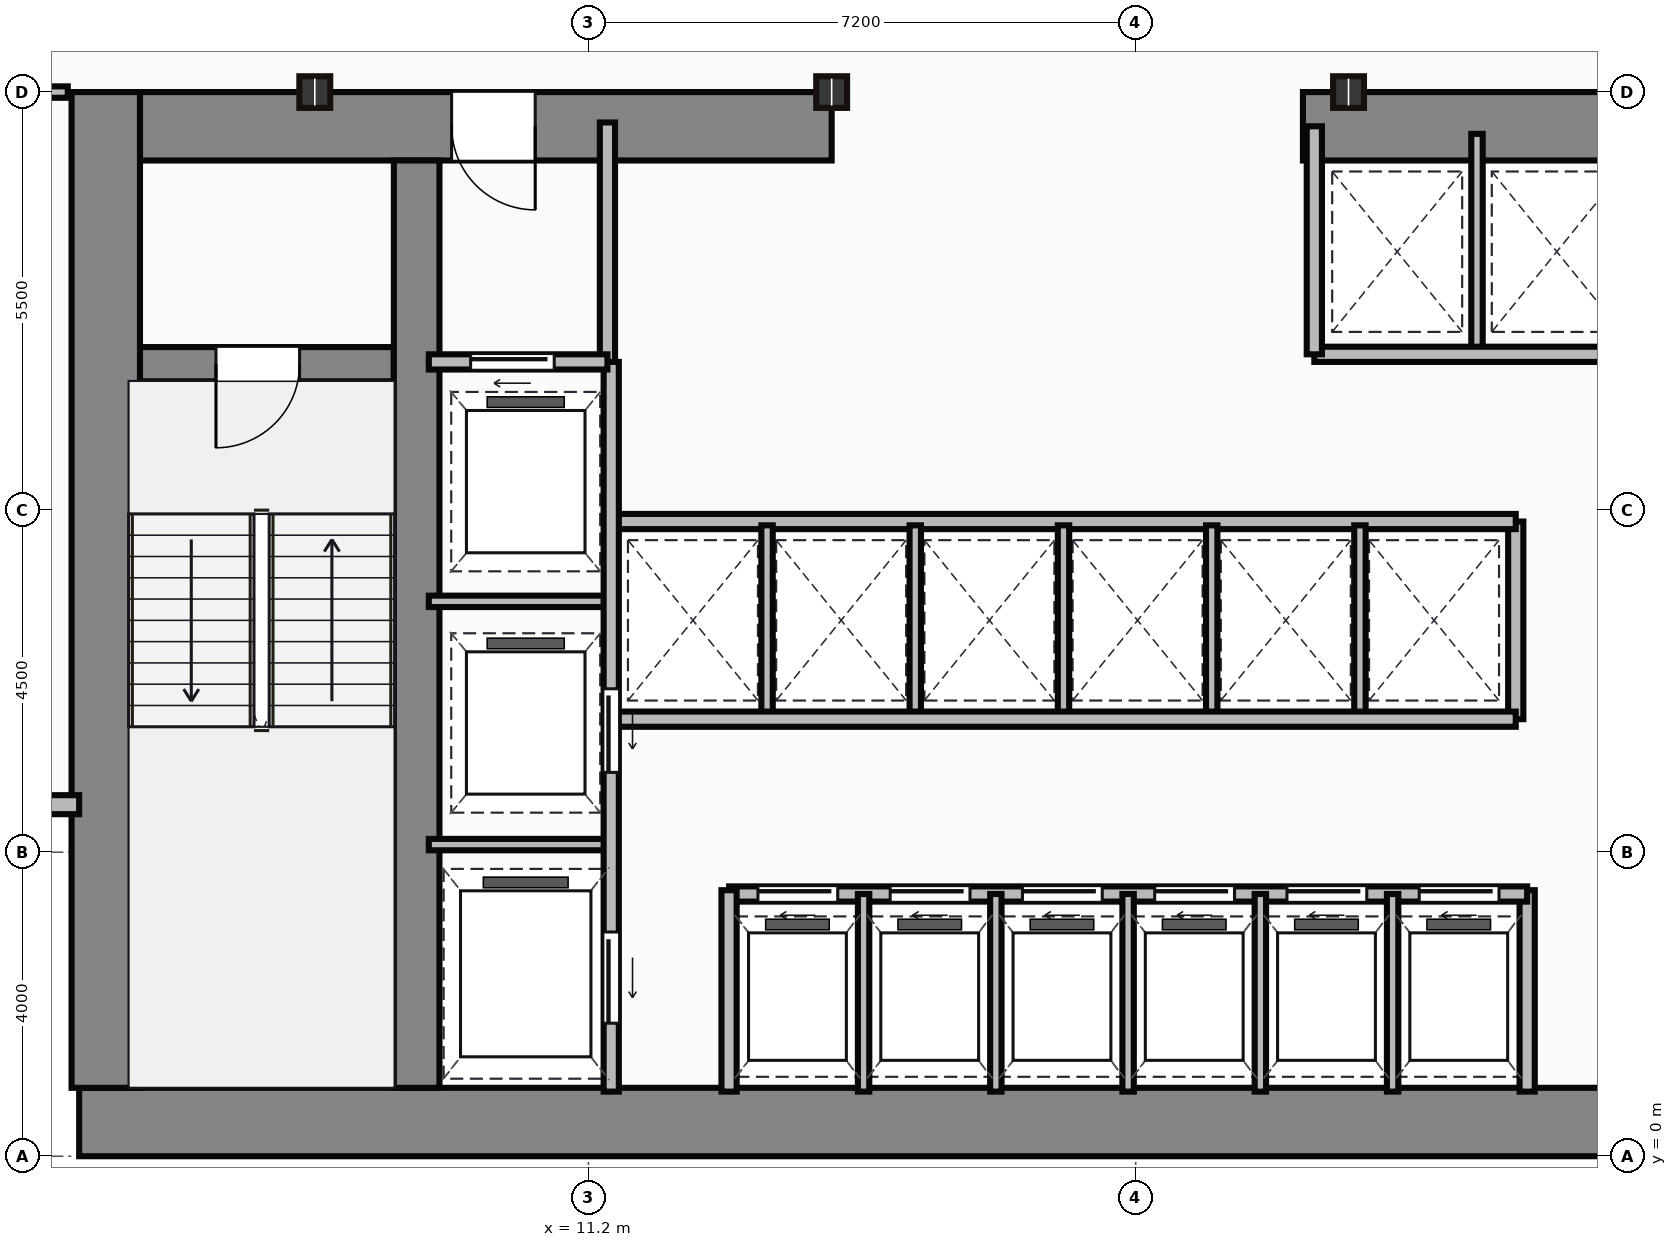
"""IFC4 building model, lengths in metres.
Left out: names, types, materials, properties, quantities, classifications, styles, units other than length and angle.
Written with IfcOpenShell. Run it as: python <this file> out.ifc"""

import sys

from ifc_helpers import new_model, si_unit, direction, frame, frame_2d, origin, origin_2d, place, context, subcontext, project, spatial, rectangle, i_section, extrude, source, transform, mapped, element, fill, save


model = new_model("IFC4")
c1 = context("Model", 3, precision=1e-05, world=origin(), true_north=direction((0.0, 1.0)))
c2 = subcontext(c1, "Body", "Model", "MODEL_VIEW")
j1 = project(units=[si_unit("LENGTHUNIT", "METRE"), si_unit("PLANEANGLEUNIT", "RADIAN")], contexts=[c1])
p1 = place(None, origin())
s1 = spatial("IfcSite", under=j1, at=p1, CompositionType="ELEMENT")
p2 = place(p1, origin())
s2 = spatial("IfcBuilding", under=s1, at=p2, CompositionType="ELEMENT")
p3 = place(p2, frame((0.0, 0.0, 76.3)))
s3 = spatial("IfcBuildingStorey", under=s2, at=p3, CompositionType="ELEMENT", Elevation=76.3)
m1 = source(origin(), c2, "Body", "SweptSolid", [
    extrude(rectangle(XDim=29.5, YDim=0.9, at=frame_2d((14.75, 0.0))), origin(), (0.0, 0.0, 1.0), 3.65),
])
p4 = place(p3, frame((4.5, 0.45, 0.0), z_axis=(0.0, 0.0, 1.0), x_axis=(1.0, 0.0, 0.0)))
e1 = element("IfcWall", 1, at=p4, inside=s3, PredefinedType="SHEAR", context=c2, shape_type="MappedRepresentation", body=[
    mapped(m1, transform((0.0, 0.0, 0.0))),
])
m2 = source(origin(), c2, "Body", "SweptSolid", [
    extrude(rectangle(XDim=13.1, YDim=0.9, at=frame_2d((6.55, 0.0))), origin(), (0.0, 0.0, 1.0), 3.65),
])
p5 = place(p3, frame((4.85, 0.9, 0.0), z_axis=(0.0, 0.0, 1.0), x_axis=(0.0, 1.0, 0.0)))
e2 = element("IfcWall", 2, at=p5, inside=s3, PredefinedType="SHEAR", context=c2, shape_type="MappedRepresentation", body=[
    mapped(m2, transform((0.0, 0.0, 0.0))),
])
m3 = source(origin(), c2, "Body", "SweptSolid", [
    extrude(rectangle(XDim=9.1, YDim=0.9, at=frame_2d((4.55, 0.0))), origin(), (0.0, 0.0, 1.0), 3.65),
])
p6 = place(p3, frame((5.3, 13.55, 0.0), z_axis=(0.0, 0.0, 1.0), x_axis=(1.0, 0.0, 0.0)))
e3 = element("IfcWall", 3, at=p6, inside=s3, PredefinedType="SHEAR", context=c2, shape_type="MappedRepresentation", body=[
    mapped(m3, transform((0.0, 0.0, 0.0))),
])
p7 = place(p6, frame((4.1, 0.0, 0.0)))
e4 = element("IfcOpeningElement", 4, at=p7, cuts=e3, PredefinedType="OPENING", context=c2, shape_type="SweptSolid", body=[
    extrude(rectangle(XDim=1.1, YDim=2.15, at=frame_2d((0.55, 1.075))), frame((0.0, 0.46, 0.0), z_axis=(0.0, -1.0, 0.0), x_axis=(1.0, 0.0, 0.0)), (0.0, 0.0, 1.0), 0.92),
])
m4 = source(origin(), c2, "Body", "SweptSolid", [
    extrude(rectangle(XDim=12.6, YDim=0.9, at=frame_2d((6.3, 0.0))), origin(), (0.0, 0.0, 1.0), 3.65),
])
p8 = place(p3, frame((20.6, 13.55, 0.0), z_axis=(0.0, 0.0, 1.0), x_axis=(1.0, 0.0, 0.0)))
e5 = element("IfcWall", 5, at=p8, inside=s3, PredefinedType="SHEAR", context=c2, shape_type="MappedRepresentation", body=[
    mapped(m4, transform((0.0, 0.0, 0.0))),
])
p9 = place(p8, frame((9.25, 0.0, 0.0)))
e6 = element("IfcOpeningElement", 6, at=p9, cuts=e5, PredefinedType="OPENING", context=c2, shape_type="SweptSolid", body=[
    extrude(rectangle(XDim=1.1, YDim=2.15, at=frame_2d((0.55, 1.075))), frame((0.0, 0.46, 0.0), z_axis=(0.0, -1.0, 0.0), x_axis=(1.0, 0.0, 0.0)), (0.0, 0.0, 1.0), 0.92),
])
m5 = source(origin(), c2, "Body", "SweptSolid", [
    extrude(rectangle(XDim=12.2, YDim=0.6, at=frame_2d((6.1, 0.0))), origin(), (0.0, 0.0, 1.0), 3.65),
])
p10 = place(p3, frame((8.94, 0.9, 0.0), z_axis=(0.0, 0.0, 1.0), x_axis=(0.0, 1.0, 0.0)))
e7 = element("IfcWall", 7, at=p10, inside=s3, PredefinedType="SHEAR", context=c2, shape_type="MappedRepresentation", body=[
    mapped(m5, transform((0.0, 0.0, 0.0))),
])
m6 = source(origin(), c2, "Body", "SweptSolid", [
    extrude(rectangle(XDim=3.39, YDim=0.45, at=frame_2d((1.695, 0.0))), origin(), (0.0, 0.0, 1.0), 3.65),
])
p11 = place(p3, frame((5.25, 10.42, 0.0), z_axis=(0.0, 0.0, 1.0), x_axis=(1.0, 0.0, 0.0)))
e8 = element("IfcWall", 8, at=p11, inside=s3, PredefinedType="SHEAR", context=c2, shape_type="MappedRepresentation", body=[
    mapped(m6, transform((0.0, 0.0, 0.0))),
])
p12 = place(p11, frame((1.05, 0.0, 0.0)))
e9 = element("IfcOpeningElement", 9, at=p12, cuts=e8, PredefinedType="OPENING", context=c2, shape_type="SweptSolid", body=[
    extrude(rectangle(XDim=1.1, YDim=2.15, at=frame_2d((0.55, 1.075))), frame((0.0, 0.235, 0.0), z_axis=(0.0, -1.0, 0.0), x_axis=(1.0, 0.0, 0.0)), (0.0, 0.0, 1.0), 0.47),
])
m7 = source(origin(), c2, "Body", "SweptSolid", [
    extrude(i_section(OverallWidth=0.406, OverallDepth=0.416, WebThickness=0.03, FlangeThickness=0.048, at=origin_2d()), origin(), (0.0, 0.0, 1.0), 3.65),
])
for number, where, z_axis, x_axis in (
    (10, (7.6, 14.0, 0.0), (0.0, 0.0, 1.0), (1.0, 0.0, 0.0)),
    (11, (14.4, 14.0, 0.0), (0.0, 0.0, 1.0), (1.0, 0.0, 0.0)),
    (12, (21.2, 14.0, 0.0), (0.0, 0.0, 1.0), (1.0, 0.0, 0.0)),
):
    element("IfcColumn", number, at=place(p3, frame(where, z_axis=z_axis, x_axis=x_axis)), inside=s3, PredefinedType="COLUMN", context=c2, shape_type="MappedRepresentation", body=[
        mapped(m7, transform((0.0, 0.0, 0.0))),
    ])
m8 = source(origin(), c2, "Body", "SweptSolid", [
    extrude(rectangle(XDim=4.5, YDim=0.25, at=frame_2d((2.25, 0.0))), origin(), (0.0, 0.0, 1.0), 3.4),
])
p13 = place(p3, frame((0.0, 4.625, 0.0), z_axis=(0.0, 0.0, 1.0), x_axis=(1.0, 0.0, 0.0)))
e13 = element("IfcWall", 13, at=p13, inside=s3, PredefinedType="STANDARD", context=c2, shape_type="MappedRepresentation", body=[
    mapped(m8, transform((0.0, 0.0, 0.0))),
])
m9 = source(origin(), c2, "Body", "SweptSolid", [
    extrude(rectangle(XDim=3.18, YDim=0.2, at=frame_2d((1.59, 0.0))), origin(), (0.0, 0.0, 1.0), 3.4),
])
p14 = place(p3, frame((11.45, 10.42, 0.0), z_axis=(0.0, 0.0, 1.0), x_axis=(0.0, 1.0, 0.0)))
e14 = element("IfcWall", 14, at=p14, inside=s3, PredefinedType="PARTITIONING", context=c2, shape_type="MappedRepresentation", body=[
    mapped(m9, transform((0.0, 0.0, 0.0))),
])
m10 = source(origin(), c2, "Body", "SweptSolid", [
    extrude(rectangle(XDim=2.35, YDim=0.2, at=frame_2d((1.175, 0.0))), origin(), (0.0, 0.0, 1.0), 3.4),
])
p15 = place(p3, frame((9.1, 10.45, 0.0), z_axis=(0.0, 0.0, 1.0), x_axis=(1.0, 0.0, 0.0)))
e15 = element("IfcWall", 15, at=p15, inside=s3, PredefinedType="PARTITIONING", context=c2, shape_type="MappedRepresentation", body=[
    mapped(m10, transform((0.0, 0.0, 0.0))),
])
p16 = place(p15, frame((0.55, 0.0, 0.0)))
e16 = element("IfcOpeningElement", 16, at=p16, cuts=e15, PredefinedType="OPENING", context=c2, shape_type="SweptSolid", body=[
    extrude(rectangle(XDim=1.1, YDim=2.15, at=frame_2d((0.55, 1.075))), frame((0.0, 0.11, 0.0), z_axis=(0.0, -1.0, 0.0), x_axis=(1.0, 0.0, 0.0)), (0.0, 0.0, 1.0), 0.22),
])
m11 = source(origin(), c2, "Body", "SweptSolid", [
    extrude(rectangle(XDim=9.6, YDim=0.2, at=frame_2d((4.8, 0.0))), origin(), (0.0, 0.0, 1.0), 3.4),
])
p17 = place(p3, frame((11.5, 0.85, 0.0), z_axis=(0.0, 0.0, 1.0), x_axis=(0.0, 1.0, 0.0)))
e17 = element("IfcWall", 17, at=p17, inside=s3, PredefinedType="PARTITIONING", context=c2, shape_type="MappedRepresentation", body=[
    mapped(m11, transform((0.0, 0.0, 0.0))),
])
p18 = place(p17, frame((4.2, 0.0, 0.0)))
e18 = element("IfcOpeningElement", 18, at=p18, cuts=e17, PredefinedType="OPENING", context=c2, shape_type="SweptSolid", body=[
    extrude(rectangle(XDim=1.1, YDim=2.15, at=frame_2d((0.55, 1.075))), frame((0.0, 0.11, 0.0), z_axis=(0.0, -1.0, 0.0), x_axis=(1.0, 0.0, 0.0)), (0.0, 0.0, 1.0), 0.22),
])
p19 = place(p17, frame((0.9, 0.0, 0.0)))
e19 = element("IfcOpeningElement", 19, at=p19, cuts=e17, PredefinedType="OPENING", context=c2, shape_type="SweptSolid", body=[
    extrude(rectangle(XDim=1.2, YDim=2.15, at=frame_2d((0.6, 1.075))), frame((0.0, 0.11, 0.0), z_axis=(0.0, -1.0, 0.0), x_axis=(1.0, 0.0, 0.0)), (0.0, 0.0, 1.0), 0.22),
])
m12 = source(origin(), c2, "Body", "SweptSolid", [
    extrude(rectangle(XDim=2.4, YDim=0.15, at=frame_2d((1.2, 0.0))), origin(), (0.0, 0.0, 1.0), 3.4),
])
for number, where, z_axis, x_axis in (
    (20, (9.1, 4.1, 0.0), (0.0, 0.0, 1.0), (1.0, 0.0, 0.0)),
    (21, (9.1, 7.3, 0.0), (0.0, 0.0, 1.0), (1.0, 0.0, 0.0)),
):
    element("IfcWall", number, at=place(p3, frame(where, z_axis=z_axis, x_axis=x_axis)), inside=s3, PredefinedType="PARTITIONING", context=c2, shape_type="MappedRepresentation", body=[
        mapped(m12, transform((0.0, 0.0, 0.0))),
    ])
m13 = source(origin(), c2, "Body", "SweptSolid", [
    extrude(rectangle(XDim=2.65, YDim=0.2, at=frame_2d((1.325, 0.0))), origin(), (0.0, 0.0, 1.0), 3.4),
])
p20 = place(p3, frame((13.05, 0.85, 0.0), z_axis=(0.0, 0.0, 1.0), x_axis=(0.0, 1.0, 0.0)))
e22 = element("IfcWall", 22, at=p20, inside=s3, PredefinedType="PARTITIONING", context=c2, shape_type="MappedRepresentation", body=[
    mapped(m13, transform((0.0, 0.0, 0.0))),
])
m14 = source(origin(), c2, "Body", "SweptSolid", [
    extrude(rectangle(XDim=10.5, YDim=0.2, at=frame_2d((5.25, 0.0))), origin(), (0.0, 0.0, 1.0), 3.4),
])
p21 = place(p3, frame((13.05, 3.45, 0.0), z_axis=(0.0, 0.0, 1.0), x_axis=(1.0, 0.0, 0.0)))
e23 = element("IfcWall", 23, at=p21, inside=s3, PredefinedType="PARTITIONING", context=c2, shape_type="MappedRepresentation", body=[
    mapped(m14, transform((0.0, 0.0, 0.0))),
])
p22 = place(p21, frame((0.38, 0.0, 0.0)))
e24 = element("IfcOpeningElement", 24, at=p22, cuts=e23, PredefinedType="OPENING", context=c2, shape_type="SweptSolid", body=[
    extrude(rectangle(XDim=1.05, YDim=2.15, at=frame_2d((0.525, 1.075))), frame((0.0, 0.11, 0.0), z_axis=(0.0, -1.0, 0.0), x_axis=(1.0, 0.0, 0.0)), (0.0, 0.0, 1.0), 0.22),
])
p23 = place(p21, frame((2.12, 0.0, 0.0)))
e25 = element("IfcOpeningElement", 25, at=p23, cuts=e23, PredefinedType="OPENING", context=c2, shape_type="SweptSolid", body=[
    extrude(rectangle(XDim=1.05, YDim=2.15, at=frame_2d((0.525, 1.075))), frame((0.0, 0.11, 0.0), z_axis=(0.0, -1.0, 0.0), x_axis=(1.0, 0.0, 0.0)), (0.0, 0.0, 1.0), 0.22),
])
p24 = place(p21, frame((3.86, 0.0, 0.0)))
e26 = element("IfcOpeningElement", 26, at=p24, cuts=e23, PredefinedType="OPENING", context=c2, shape_type="SweptSolid", body=[
    extrude(rectangle(XDim=1.05, YDim=2.15, at=frame_2d((0.525, 1.075))), frame((0.0, 0.11, 0.0), z_axis=(0.0, -1.0, 0.0), x_axis=(1.0, 0.0, 0.0)), (0.0, 0.0, 1.0), 0.22),
])
p25 = place(p21, frame((5.6, 0.0, 0.0)))
e27 = element("IfcOpeningElement", 27, at=p25, cuts=e23, PredefinedType="OPENING", context=c2, shape_type="SweptSolid", body=[
    extrude(rectangle(XDim=1.05, YDim=2.15, at=frame_2d((0.525, 1.075))), frame((0.0, 0.11, 0.0), z_axis=(0.0, -1.0, 0.0), x_axis=(1.0, 0.0, 0.0)), (0.0, 0.0, 1.0), 0.22),
])
p26 = place(p21, frame((7.34, 0.0, 0.0)))
e28 = element("IfcOpeningElement", 28, at=p26, cuts=e23, PredefinedType="OPENING", context=c2, shape_type="SweptSolid", body=[
    extrude(rectangle(XDim=1.05, YDim=2.15, at=frame_2d((0.525, 1.075))), frame((0.0, 0.11, 0.0), z_axis=(0.0, -1.0, 0.0), x_axis=(1.0, 0.0, 0.0)), (0.0, 0.0, 1.0), 0.22),
])
p27 = place(p21, frame((9.08, 0.0, 0.0)))
e29 = element("IfcOpeningElement", 29, at=p27, cuts=e23, PredefinedType="OPENING", context=c2, shape_type="SweptSolid", body=[
    extrude(rectangle(XDim=1.05, YDim=2.15, at=frame_2d((0.525, 1.075))), frame((0.0, 0.11, 0.0), z_axis=(0.0, -1.0, 0.0), x_axis=(1.0, 0.0, 0.0)), (0.0, 0.0, 1.0), 0.22),
])
p28 = place(p3, frame((23.55, 0.85, 0.0), z_axis=(0.0, 0.0, 1.0), x_axis=(0.0, 1.0, 0.0)))
e30 = element("IfcWall", 30, at=p28, inside=s3, PredefinedType="PARTITIONING", context=c2, shape_type="MappedRepresentation", body=[
    mapped(m13, transform((0.0, 0.0, 0.0))),
])
m15 = source(origin(), c2, "Body", "SweptSolid", [
    extrude(rectangle(XDim=2.6, YDim=0.15, at=frame_2d((1.3, 0.0))), origin(), (0.0, 0.0, 1.0), 3.4),
])
for number, where, z_axis, x_axis in (
    (31, (14.82, 0.85, 0.0), (0.0, 0.0, 1.0), (0.0, 1.0, 0.0)),
    (32, (16.56, 0.85, 0.0), (0.0, 0.0, 1.0), (0.0, 1.0, 0.0)),
    (33, (18.3, 0.85, 0.0), (0.0, 0.0, 1.0), (0.0, 1.0, 0.0)),
    (34, (20.04, 0.85, 0.0), (0.0, 0.0, 1.0), (0.0, 1.0, 0.0)),
    (35, (21.78, 0.85, 0.0), (0.0, 0.0, 1.0), (0.0, 1.0, 0.0)),
):
    element("IfcWall", number, at=place(p3, frame(where, z_axis=z_axis, x_axis=x_axis)), inside=s3, PredefinedType="PARTITIONING", context=c2, shape_type="MappedRepresentation", body=[
        mapped(m15, transform((0.0, 0.0, 0.0))),
    ])
m16 = source(origin(), c2, "Body", "SweptSolid", [
    extrude(rectangle(XDim=11.85, YDim=0.2, at=frame_2d((5.925, 0.0))), origin(), (0.0, 0.0, 1.0), 3.4),
])
for number, where, z_axis, x_axis in (
    (36, (11.55, 5.75, 0.0), (0.0, 0.0, 1.0), (1.0, 0.0, 0.0)),
    (37, (11.55, 8.35, 0.0), (0.0, 0.0, 1.0), (1.0, 0.0, 0.0)),
):
    element("IfcWall", number, at=place(p3, frame(where, z_axis=z_axis, x_axis=x_axis)), inside=s3, PredefinedType="PARTITIONING", context=c2, shape_type="MappedRepresentation", body=[
        mapped(m16, transform((0.0, 0.0, 0.0))),
    ])
m17 = source(origin(), c2, "Body", "SweptSolid", [
    extrude(rectangle(XDim=2.6, YDim=0.2, at=frame_2d((1.3, 0.0))), origin(), (0.0, 0.0, 1.0), 3.4),
])
p29 = place(p3, frame((23.4, 5.75, 0.0), z_axis=(0.0, 0.0, 1.0), x_axis=(0.0, 1.0, 0.0)))
e38 = element("IfcWall", 38, at=p29, inside=s3, PredefinedType="PARTITIONING", context=c2, shape_type="MappedRepresentation", body=[
    mapped(m17, transform((0.0, 0.0, 0.0))),
])
m18 = source(origin(), c2, "Body", "SweptSolid", [
    extrude(rectangle(XDim=2.5, YDim=0.15, at=frame_2d((1.25, 0.0))), origin(), (0.0, 0.0, 1.0), 3.4),
])
for number, where, z_axis, x_axis in (
    (39, (13.55, 5.8, 0.0), (0.0, 0.0, 1.0), (0.0, 1.0, 0.0)),
    (40, (15.5, 5.8, 0.0), (0.0, 0.0, 1.0), (0.0, 1.0, 0.0)),
    (41, (17.45, 5.8, 0.0), (0.0, 0.0, 1.0), (0.0, 1.0, 0.0)),
    (42, (19.4, 5.8, 0.0), (0.0, 0.0, 1.0), (0.0, 1.0, 0.0)),
    (43, (21.35, 5.8, 0.0), (0.0, 0.0, 1.0), (0.0, 1.0, 0.0)),
):
    element("IfcWall", number, at=place(p3, frame(where, z_axis=z_axis, x_axis=x_axis)), inside=s3, PredefinedType="PARTITIONING", context=c2, shape_type="MappedRepresentation", body=[
        mapped(m18, transform((0.0, 0.0, 0.0))),
    ])
m19 = source(origin(), c2, "Body", "SweptSolid", [
    extrude(rectangle(XDim=8.8, YDim=0.2, at=frame_2d((4.4, 0.0))), origin(), (0.0, 0.0, 1.0), 3.4),
])
p30 = place(p3, frame((20.75, 10.55, 0.0), z_axis=(0.0, 0.0, 1.0), x_axis=(1.0, 0.0, 0.0)))
e44 = element("IfcWall", 44, at=p30, inside=s3, PredefinedType="PARTITIONING", context=c2, shape_type="MappedRepresentation", body=[
    mapped(m19, transform((0.0, 0.0, 0.0))),
])
m20 = source(origin(), c2, "Body", "SweptSolid", [
    extrude(rectangle(XDim=3.0, YDim=0.2, at=frame_2d((1.5, 0.0))), origin(), (0.0, 0.0, 1.0), 3.4),
])
p31 = place(p3, frame((20.75, 10.55, 0.0), z_axis=(0.0, 0.0, 1.0), x_axis=(0.0, 1.0, 0.0)))
e45 = element("IfcWall", 45, at=p31, inside=s3, PredefinedType="PARTITIONING", context=c2, shape_type="MappedRepresentation", body=[
    mapped(m20, transform((0.0, 0.0, 0.0))),
])
m21 = source(origin(), c2, "Body", "SweptSolid", [
    extrude(rectangle(XDim=2.85, YDim=0.15, at=frame_2d((1.425, 0.0))), origin(), (0.0, 0.0, 1.0), 3.4),
])
p32 = place(p3, frame((22.89, 10.6, 0.0), z_axis=(0.0, 0.0, 1.0), x_axis=(0.0, 1.0, 0.0)))
e46 = element("IfcWall", 46, at=p32, inside=s3, PredefinedType="PARTITIONING", context=c2, shape_type="MappedRepresentation", body=[
    mapped(m21, transform((0.0, 0.0, 0.0))),
])
m22 = source(origin(), c2, "Body", "SweptSolid", [
    extrude(rectangle(XDim=0.95, YDim=0.15, at=frame_2d((0.475, 0.0))), origin(), (0.0, 0.0, 1.0), 2.625),
])
p33 = place(p3, frame((4.35, 14.0, 0.0), z_axis=(0.0, 0.0, 1.0), x_axis=(-1.0, 0.0, 0.0)))
e47 = element("IfcWall", 47, at=p33, inside=s3, PredefinedType="PARTITIONING", context=c2, shape_type="MappedRepresentation", body=[
    mapped(m22, transform((0.0, 0.0, 0.0))),
])
m23 = source(origin(), c2, "Body", "SweptSolid", [
    extrude(rectangle(XDim=1.1, YDim=2.15, at=frame_2d((0.55, 1.075))), frame((0.0, 0.025, 0.0), z_axis=(0.0, -1.0, 0.0), x_axis=(1.0, 0.0, 0.0)), (0.0, 0.0, 1.0), 0.05),
])
p34 = place(p12, frame((1.1, 0.0, 0.0), z_axis=(0.0, 0.0, 1.0), x_axis=(-1.0, 0.0, 0.0)))
e48 = element("IfcDoor", 48, at=p34, inside=s3, OperationType="SINGLE_SWING_LEFT", PredefinedType="DOOR", context=c2, shape_type="MappedRepresentation", body=[
    mapped(m23, transform((0.0, 0.0, 0.0))),
])
fill(e9, e48)
p35 = place(p7, origin())
e49 = element("IfcDoor", 49, at=p35, inside=s3, OperationType="SINGLE_SWING_RIGHT", PredefinedType="DOOR", context=c2, shape_type="MappedRepresentation", body=[
    mapped(m23, transform((0.0, 0.0, 0.0))),
])
fill(e4, e49)
p36 = place(p16, origin())
e50 = element("IfcDoor", 50, at=p36, inside=s3, OperationType="SLIDING_TO_LEFT", PredefinedType="DOOR", context=c2, shape_type="MappedRepresentation", body=[
    mapped(m23, transform((0.0, 0.0, 0.0))),
])
fill(e16, e50)
p37 = place(p18, frame((1.1, 0.0, 0.0), z_axis=(0.0, 0.0, 1.0), x_axis=(-1.0, 0.0, 0.0)))
e51 = element("IfcDoor", 51, at=p37, inside=s3, OperationType="SLIDING_TO_LEFT", PredefinedType="DOOR", context=c2, shape_type="MappedRepresentation", body=[
    mapped(m23, transform((0.0, 0.0, 0.0))),
])
fill(e18, e51)
m24 = source(origin(), c2, "Body", "SweptSolid", [
    extrude(rectangle(XDim=1.2, YDim=2.15, at=frame_2d((0.6, 1.075))), frame((0.0, 0.025, 0.0), z_axis=(0.0, -1.0, 0.0), x_axis=(1.0, 0.0, 0.0)), (0.0, 0.0, 1.0), 0.05),
])
p38 = place(p19, frame((1.2, 0.0, 0.0), z_axis=(0.0, 0.0, 1.0), x_axis=(-1.0, 0.0, 0.0)))
e52 = element("IfcDoor", 52, at=p38, inside=s3, OperationType="SLIDING_TO_LEFT", PredefinedType="DOOR", context=c2, shape_type="MappedRepresentation", body=[
    mapped(m24, transform((0.0, 0.0, 0.0))),
])
fill(e19, e52)
m25 = source(origin(), c2, "Body", "SweptSolid", [
    extrude(rectangle(XDim=1.05, YDim=2.15, at=frame_2d((0.525, 1.075))), frame((0.0, 0.025, 0.0), z_axis=(0.0, -1.0, 0.0), x_axis=(1.0, 0.0, 0.0)), (0.0, 0.0, 1.0), 0.05),
])
p39 = place(p22, origin())
e53 = element("IfcDoor", 53, at=p39, inside=s3, OperationType="SLIDING_TO_LEFT", PredefinedType="DOOR", context=c2, shape_type="MappedRepresentation", body=[
    mapped(m25, transform((0.0, 0.0, 0.0))),
])
fill(e24, e53)
p40 = place(p23, origin())
e54 = element("IfcDoor", 54, at=p40, inside=s3, OperationType="SLIDING_TO_LEFT", PredefinedType="DOOR", context=c2, shape_type="MappedRepresentation", body=[
    mapped(m25, transform((0.0, 0.0, 0.0))),
])
fill(e25, e54)
p41 = place(p24, origin())
e55 = element("IfcDoor", 55, at=p41, inside=s3, OperationType="SLIDING_TO_LEFT", PredefinedType="DOOR", context=c2, shape_type="MappedRepresentation", body=[
    mapped(m25, transform((0.0, 0.0, 0.0))),
])
fill(e26, e55)
p42 = place(p25, origin())
e56 = element("IfcDoor", 56, at=p42, inside=s3, OperationType="SLIDING_TO_LEFT", PredefinedType="DOOR", context=c2, shape_type="MappedRepresentation", body=[
    mapped(m25, transform((0.0, 0.0, 0.0))),
])
fill(e27, e56)
p43 = place(p26, origin())
e57 = element("IfcDoor", 57, at=p43, inside=s3, OperationType="SLIDING_TO_LEFT", PredefinedType="DOOR", context=c2, shape_type="MappedRepresentation", body=[
    mapped(m25, transform((0.0, 0.0, 0.0))),
])
fill(e28, e57)
p44 = place(p27, origin())
e58 = element("IfcDoor", 58, at=p44, inside=s3, OperationType="SLIDING_TO_LEFT", PredefinedType="DOOR", context=c2, shape_type="MappedRepresentation", body=[
    mapped(m25, transform((0.0, 0.0, 0.0))),
])
fill(e29, e58)
save(model, sys.argv[1])
